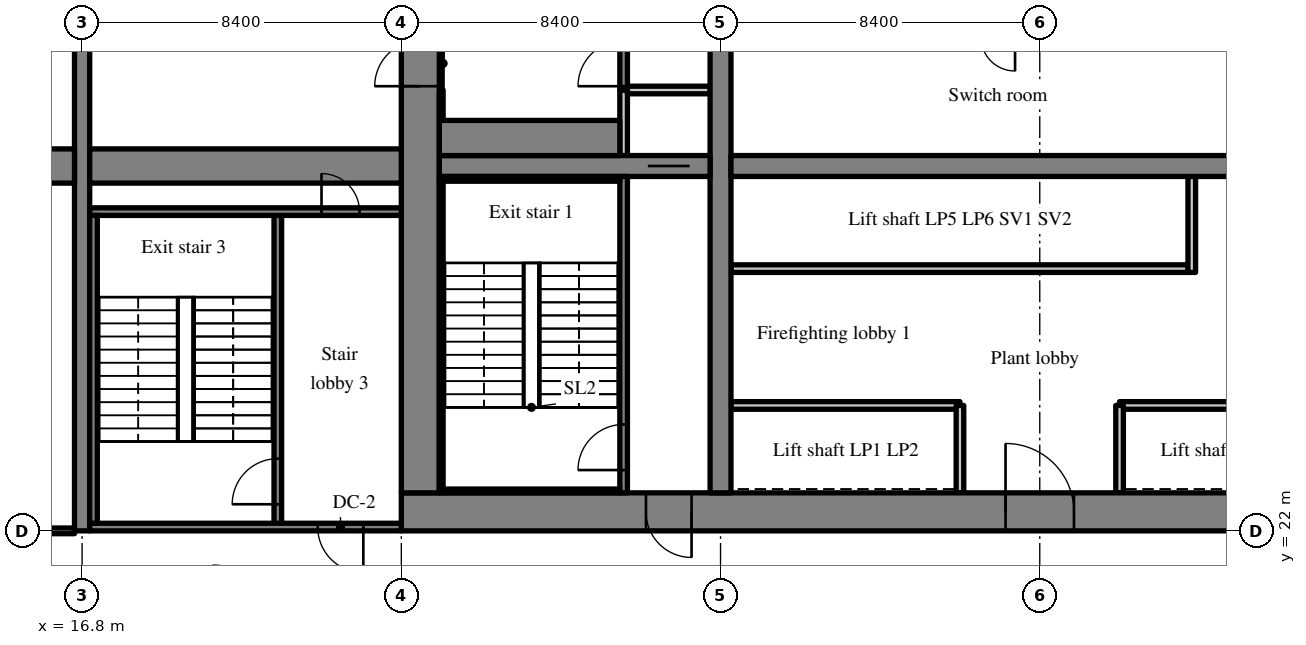
"""IFC4 building model, lengths in metres.
Left out: names, types, materials, properties, quantities, classifications, styles, units other than length and angle.
Written with IfcOpenShell. Run it as: python <this file> out.ifc"""

import sys

from ifc_helpers import new_model, si_unit, direction, frame, frame_2d, origin, place, context, subcontext, project, spatial, rectangle, extrude, source, transform, mapped, element, fill, save


model = new_model("IFC4")
c1 = context("Model", 3, precision=1e-05, world=origin(), true_north=direction((0.0, 1.0)))
c2 = subcontext(c1, "Body", "Model", "MODEL_VIEW")
j1 = project(units=[si_unit("LENGTHUNIT", "METRE"), si_unit("PLANEANGLEUNIT", "RADIAN")], contexts=[c1])
p1 = place(None, origin())
s1 = spatial("IfcSite", under=j1, at=p1, CompositionType="ELEMENT")
p2 = place(p1, origin())
s2 = spatial("IfcBuilding", under=s1, at=p2, CompositionType="ELEMENT")
p3 = place(p2, frame((0.0, 0.0, 81.0)))
s3 = spatial("IfcBuildingStorey", under=s2, at=p3, CompositionType="ELEMENT", Elevation=81.0)
m1 = source(origin(), c2, "Body", "SweptSolid", [
    extrude(rectangle(XDim=50.4, YDim=1.0, at=frame_2d((25.2, 0.0))), origin(), (0.0, 0.0, 1.0), 5.12),
])
p4 = place(p3, frame((25.2, 22.5, 0.0), z_axis=(0.0, 0.0, 1.0), x_axis=(1.0, 0.0, 0.0)))
e1 = element("IfcWall", 1, at=p4, inside=s3, PredefinedType="SHEAR", context=c2, shape_type="MappedRepresentation", body=[
    mapped(m1, transform((0.0, 0.0, 0.0), scale=1.0)),
])
m2 = source(origin(), c2, "Body", "SweptSolid", [
    extrude(rectangle(XDim=1.8, YDim=2.1, at=frame_2d((0.9, 1.05))), frame((0.0, 0.51, 0.0), z_axis=(0.0, -1.0, 0.0), x_axis=(1.0, 0.0, 0.0)), (0.0, 0.0, 1.0), 1.02),
])
p5 = place(p4, frame((15.9, 0.0, 0.0)))
e2 = element("IfcOpeningElement", 2, at=p5, cuts=e1, PredefinedType="OPENING", context=c2, shape_type="MappedRepresentation", body=[
    mapped(m2, transform((0.0, 0.0, 0.0), scale=1.0)),
])
m3 = source(origin(), c2, "Body", "SweptSolid", [
    extrude(rectangle(XDim=1.2, YDim=2.1, at=frame_2d((0.6, 1.05))), frame((0.0, 0.51, 0.0), z_axis=(0.0, -1.0, 0.0), x_axis=(1.0, 0.0, 0.0)), (0.0, 0.0, 1.0), 1.02),
])
p6 = place(p4, frame((26.987, 0.0, 0.0)))
e3 = element("IfcOpeningElement", 3, at=p6, cuts=e1, PredefinedType="OPENING", context=c2, shape_type="MappedRepresentation", body=[
    mapped(m3, transform((0.0, 0.0, 0.0), scale=1.0)),
])
m4 = source(origin(), c2, "Body", "SweptSolid", [
    extrude(rectangle(XDim=0.9, YDim=2.1, at=frame_2d((0.45, 1.05))), frame((0.0, 0.51, 0.0), z_axis=(0.0, -1.0, 0.0), x_axis=(1.0, 0.0, 0.0)), (0.0, 0.0, 1.0), 1.02),
])
p7 = place(p4, frame((33.75, 0.0, 0.0)))
e4 = element("IfcOpeningElement", 4, at=p7, cuts=e1, PredefinedType="OPENING", context=c2, shape_type="MappedRepresentation", body=[
    mapped(m4, transform((0.0, 0.0, 0.0), scale=1.0)),
])
p8 = place(p4, frame((30.75, 0.0, 0.0)))
e5 = element("IfcOpeningElement", 5, at=p8, cuts=e1, PredefinedType="OPENING", context=c2, shape_type="MappedRepresentation", body=[
    mapped(m4, transform((0.0, 0.0, 0.0), scale=1.0)),
])
p9 = place(p4, frame((38.262, 0.0, 0.0)))
e6 = element("IfcOpeningElement", 6, at=p9, cuts=e1, PredefinedType="OPENING", context=c2, shape_type="MappedRepresentation", body=[
    mapped(m4, transform((0.0, 0.0, 0.0), scale=1.0)),
])
p10 = place(p4, frame((6.438, 0.0, 0.0)))
e7 = element("IfcOpeningElement", 7, at=p10, cuts=e1, PredefinedType="OPENING", context=c2, shape_type="MappedRepresentation", body=[
    mapped(m3, transform((0.0, 0.0, 0.0), scale=1.0)),
])
p11 = place(p4, frame((47.725, 0.0, 0.0)))
e8 = element("IfcOpeningElement", 8, at=p11, cuts=e1, PredefinedType="OPENING", context=c2, shape_type="MappedRepresentation", body=[
    mapped(m3, transform((0.0, 0.0, 0.0), scale=1.0)),
])
m5 = source(origin(), c2, "Body", "SweptSolid", [
    extrude(rectangle(XDim=18.0, YDim=1.0, at=frame_2d((9.0, 0.0))), origin(), (0.0, 0.0, 1.0), 5.12),
])
p12 = place(p3, frame((25.7, 23.0, 0.0), z_axis=(0.0, 0.0, 1.0), x_axis=(0.0, 1.0, 0.0)))
e9 = element("IfcWall", 9, at=p12, inside=s3, PredefinedType="SHEAR", context=c2, shape_type="MappedRepresentation", body=[
    mapped(m5, transform((0.0, 0.0, 0.0), scale=1.0)),
])
p13 = place(p12, frame((10.7, 0.0, 0.0)))
e10 = element("IfcOpeningElement", 10, at=p13, cuts=e9, PredefinedType="OPENING", context=c2, shape_type="MappedRepresentation", body=[
    mapped(m3, transform((0.0, 0.0, 0.0), scale=1.0)),
])
m6 = source(origin(), c2, "Body", "SweptSolid", [
    extrude(rectangle(XDim=18.0, YDim=0.55, at=frame_2d((9.0, 0.0))), origin(), (0.0, 0.0, 1.0), 5.12),
])
p14 = place(p3, frame((33.6, 23.0, 0.0), z_axis=(0.0, 0.0, 1.0), x_axis=(0.0, 1.0, 0.0)))
e11 = element("IfcWall", 11, at=p14, inside=s3, PredefinedType="SHEAR", context=c2, shape_type="MappedRepresentation", body=[
    mapped(m6, transform((0.0, 0.0, 0.0), scale=1.0)),
])
m7 = source(origin(), c2, "Body", "SweptSolid", [
    extrude(rectangle(XDim=1.1, YDim=2.1, at=frame_2d((0.55, 1.05))), frame((0.0, 0.285, 0.0), z_axis=(0.0, -1.0, 0.0), x_axis=(1.0, 0.0, 0.0)), (0.0, 0.0, 1.0), 0.57),
])
p15 = place(p14, frame((12.45, 0.0, 0.0)))
e12 = element("IfcOpeningElement", 12, at=p15, cuts=e11, PredefinedType="OPENING", context=c2, shape_type="MappedRepresentation", body=[
    mapped(m7, transform((0.0, 0.0, 0.0), scale=1.0)),
])
m8 = source(origin(), c2, "Body", "SweptSolid", [
    extrude(rectangle(XDim=7.125, YDim=0.55, at=frame_2d((3.562, 0.0))), origin(), (0.0, 0.0, 1.0), 5.12),
])
p16 = place(p3, frame((26.2, 31.6, 0.0), z_axis=(0.0, 0.0, 1.0), x_axis=(1.0, 0.0, 0.0)))
e13 = element("IfcWall", 13, at=p16, inside=s3, PredefinedType="SHEAR", context=c2, shape_type="MappedRepresentation", body=[
    mapped(m8, transform((0.0, 0.0, 0.0), scale=1.0)),
])
p17 = place(p16, frame((5.488, 0.0, 0.0)))
e14 = element("IfcOpeningElement", 14, at=p17, cuts=e13, PredefinedType="OPENING", context=c2, shape_type="MappedRepresentation", body=[
    mapped(m7, transform((0.0, 0.0, 0.0), scale=1.0)),
])
m9 = source(origin(), c2, "Body", "SweptSolid", [
    extrude(rectangle(XDim=16.25, YDim=0.55, at=frame_2d((8.125, 0.0))), origin(), (0.0, 0.0, 1.0), 5.12),
])
p18 = place(p3, frame((33.875, 31.6, 0.0), z_axis=(0.0, 0.0, 1.0), x_axis=(1.0, 0.0, 0.0)))
e15 = element("IfcWall", 15, at=p18, inside=s3, PredefinedType="SHEAR", context=c2, shape_type="MappedRepresentation", body=[
    mapped(m9, transform((0.0, 0.0, 0.0), scale=1.0)),
])
m10 = source(origin(), c2, "Body", "SweptSolid", [
    extrude(rectangle(XDim=1.0, YDim=2.1, at=frame_2d((0.5, 1.05))), frame((0.0, 0.285, 0.0), z_axis=(0.0, -1.0, 0.0), x_axis=(1.0, 0.0, 0.0)), (0.0, 0.0, 1.0), 0.57),
])
p19 = place(p18, frame((14.687, 0.0, 0.0)))
e16 = element("IfcOpeningElement", 16, at=p19, cuts=e15, PredefinedType="OPENING", context=c2, shape_type="MappedRepresentation", body=[
    mapped(m10, transform((0.0, 0.0, 0.0), scale=1.0)),
])
m11 = source(origin(), c2, "Body", "SweptSolid", [
    extrude(rectangle(XDim=20.0, YDim=0.4, at=frame_2d((10.0, 0.0))), origin(), (0.0, 0.0, 1.0), 5.12),
])
p20 = place(p3, frame((16.8, 22.0, 0.0), z_axis=(0.0, 0.0, 1.0), x_axis=(0.0, 1.0, 0.0)))
e17 = element("IfcWall", 17, at=p20, inside=s3, PredefinedType="SHEAR", context=c2, shape_type="MappedRepresentation", body=[
    mapped(m11, transform((0.0, 0.0, 0.0), scale=1.0)),
])
m12 = source(origin(), c2, "Body", "SweptSolid", [
    extrude(rectangle(XDim=1.2, YDim=2.1, at=frame_2d((0.6, 1.05))), frame((0.0, 0.21, 0.0), z_axis=(0.0, -1.0, 0.0), x_axis=(1.0, 0.0, 0.0)), (0.0, 0.0, 1.0), 0.42),
])
p21 = place(p20, frame((13.4, 0.0, 0.0)))
e18 = element("IfcOpeningElement", 18, at=p21, cuts=e17, PredefinedType="OPENING", context=c2, shape_type="MappedRepresentation", body=[
    mapped(m12, transform((0.0, 0.0, 0.0), scale=1.0)),
])
m13 = source(origin(), c2, "Body", "SweptSolid", [
    extrude(rectangle(XDim=8.0, YDim=0.9, at=frame_2d((4.0, 0.0))), origin(), (0.0, 0.0, 1.0), 5.12),
])
p22 = place(p3, frame((8.6, 31.6, 0.0), z_axis=(0.0, 0.0, 1.0), x_axis=(1.0, 0.0, 0.0)))
e19 = element("IfcWall", 19, at=p22, inside=s3, PredefinedType="SHEAR", context=c2, shape_type="MappedRepresentation", body=[
    mapped(m13, transform((0.0, 0.0, 0.0), scale=1.0)),
])
m14 = source(origin(), c2, "Body", "SweptSolid", [
    extrude(rectangle(XDim=8.2, YDim=0.9, at=frame_2d((4.1, 0.0))), origin(), (0.0, 0.0, 1.0), 5.12),
])
p23 = place(p3, frame((17.0, 31.6, 0.0), z_axis=(0.0, 0.0, 1.0), x_axis=(1.0, 0.0, 0.0)))
e20 = element("IfcWall", 20, at=p23, inside=s3, PredefinedType="SHEAR", context=c2, shape_type="MappedRepresentation", body=[
    mapped(m14, transform((0.0, 0.0, 0.0), scale=1.0)),
])
m15 = source(origin(), c2, "Body", "SweptSolid", [
    extrude(rectangle(XDim=6.025, YDim=0.2, at=frame_2d((3.012, 0.0))), origin(), (0.0, 0.0, 1.0), 5.12),
])
p24 = place(p3, frame((33.875, 25.3, 0.0), z_axis=(0.0, 0.0, 1.0), x_axis=(1.0, 0.0, 0.0)))
e21 = element("IfcWall", 21, at=p24, inside=s3, PredefinedType="SOLIDWALL", context=c2, shape_type="MappedRepresentation", body=[
    mapped(m15, transform((0.0, 0.0, 0.0), scale=1.0)),
])
m16 = source(origin(), c2, "Body", "SweptSolid", [
    extrude(rectangle(XDim=6.0, YDim=0.2, at=frame_2d((3.0, 0.0))), origin(), (0.0, 0.0, 1.0), 5.12),
])
p25 = place(p3, frame((44.1, 25.3, 0.0), z_axis=(0.0, 0.0, 1.0), x_axis=(1.0, 0.0, 0.0)))
e22 = element("IfcWall", 22, at=p25, inside=s3, PredefinedType="SOLIDWALL", context=c2, shape_type="MappedRepresentation", body=[
    mapped(m16, transform((0.0, 0.0, 0.0), scale=1.0)),
])
m17 = source(origin(), c2, "Body", "SweptSolid", [
    extrude(rectangle(XDim=12.025, YDim=0.2, at=frame_2d((6.012, 0.0))), origin(), (0.0, 0.0, 1.0), 5.12),
])
p26 = place(p3, frame((33.875, 28.9, 0.0), z_axis=(0.0, 0.0, 1.0), x_axis=(1.0, 0.0, 0.0)))
e23 = element("IfcWall", 23, at=p26, inside=s3, PredefinedType="SOLIDWALL", context=c2, shape_type="MappedRepresentation", body=[
    mapped(m17, transform((0.0, 0.0, 0.0), scale=1.0)),
])
m18 = source(origin(), c2, "Body", "SweptSolid", [
    extrude(rectangle(XDim=2.3, YDim=0.2, at=frame_2d((1.15, 0.0))), origin(), (0.0, 0.0, 1.0), 5.12),
])
for number, where, z_axis, x_axis in (
    (24, (39.9, 23.0, 0.0), (0.0, 0.0, 1.0), (0.0, 1.0, 0.0)),
    (25, (44.1, 23.0, 0.0), (0.0, 0.0, 1.0), (0.0, 1.0, 0.0)),
):
    element("IfcWall", number, at=place(p3, frame(where, z_axis=z_axis, x_axis=x_axis)), inside=s3, PredefinedType="SOLIDWALL", context=c2, shape_type="MappedRepresentation", body=[
        mapped(m18, transform((0.0, 0.0, 0.0), scale=1.0)),
    ])
m19 = source(origin(), c2, "Body", "SweptSolid", [
    extrude(rectangle(XDim=2.525, YDim=0.2, at=frame_2d((1.262, 0.0))), origin(), (0.0, 0.0, 1.0), 5.12),
])
p27 = place(p3, frame((46.0, 28.8, 0.0), z_axis=(0.0, 0.0, 1.0), x_axis=(0.0, 1.0, 0.0)))
e26 = element("IfcWall", 26, at=p27, inside=s3, PredefinedType="SOLIDWALL", context=c2, shape_type="MappedRepresentation", body=[
    mapped(m19, transform((0.0, 0.0, 0.0), scale=1.0)),
])
m20 = source(origin(), c2, "Body", "SweptSolid", [
    extrude(rectangle(XDim=8.325, YDim=0.2, at=frame_2d((4.163, 0.0))), origin(), (0.0, 0.0, 1.0), 5.12),
])
p28 = place(p3, frame((31.05, 23.0, 0.0), z_axis=(0.0, 0.0, 1.0), x_axis=(0.0, 1.0, 0.0)))
e27 = element("IfcWall", 27, at=p28, inside=s3, PredefinedType="SOLIDWALL", context=c2, shape_type="MappedRepresentation", body=[
    mapped(m20, transform((0.0, 0.0, 0.0), scale=1.0)),
])
m21 = source(origin(), c2, "Body", "SweptSolid", [
    extrude(rectangle(XDim=1.2, YDim=2.1, at=frame_2d((0.6, 1.05))), frame((0.0, 0.11, 0.0), z_axis=(0.0, -1.0, 0.0), x_axis=(1.0, 0.0, 0.0)), (0.0, 0.0, 1.0), 0.22),
])
p29 = place(p28, frame((0.6, 0.0, 0.0)))
e28 = element("IfcOpeningElement", 28, at=p29, cuts=e27, PredefinedType="OPENING", context=c2, shape_type="MappedRepresentation", body=[
    mapped(m21, transform((0.0, 0.0, 0.0), scale=1.0)),
])
m22 = source(origin(), c2, "Body", "SweptSolid", [
    extrude(rectangle(XDim=1.725, YDim=0.2, at=frame_2d((0.863, 0.0))), origin(), (0.0, 0.0, 1.0), 5.12),
])
p30 = place(p3, frame((31.05, 31.875, 0.0), z_axis=(0.0, 0.0, 1.0), x_axis=(0.0, 1.0, 0.0)))
e29 = element("IfcWall", 29, at=p30, inside=s3, PredefinedType="SOLIDWALL", context=c2, shape_type="MappedRepresentation", body=[
    mapped(m22, transform((0.0, 0.0, 0.0), scale=1.0)),
])
m23 = source(origin(), c2, "Body", "SweptSolid", [
    extrude(rectangle(XDim=2.175, YDim=0.2, at=frame_2d((1.087, 0.0))), origin(), (0.0, 0.0, 1.0), 5.12),
])
p31 = place(p3, frame((31.15, 33.6, 0.0), z_axis=(0.0, 0.0, 1.0), x_axis=(1.0, 0.0, 0.0)))
e30 = element("IfcWall", 30, at=p31, inside=s3, PredefinedType="SOLIDWALL", context=c2, shape_type="MappedRepresentation", body=[
    mapped(m23, transform((0.0, 0.0, 0.0), scale=1.0)),
])
m24 = source(origin(), c2, "Body", "SweptSolid", [
    extrude(rectangle(XDim=7.4, YDim=0.2, at=frame_2d((3.7, 0.0))), origin(), (0.0, 0.0, 1.0), 5.12),
])
p32 = place(p3, frame((31.05, 33.6, 0.0), z_axis=(0.0, 0.0, 1.0), x_axis=(0.0, 1.0, 0.0)))
e31 = element("IfcWall", 31, at=p32, inside=s3, PredefinedType="SOLIDWALL", context=c2, shape_type="MappedRepresentation", body=[
    mapped(m24, transform((0.0, 0.0, 0.0), scale=1.0)),
])
p33 = place(p32, frame((0.1, 0.0, 0.0)))
e32 = element("IfcOpeningElement", 32, at=p33, cuts=e31, PredefinedType="OPENING", context=c2, shape_type="MappedRepresentation", body=[
    mapped(m21, transform((0.0, 0.0, 0.0), scale=1.0)),
])
m25 = source(origin(), c2, "Body", "SweptSolid", [
    extrude(rectangle(XDim=8.3, YDim=0.2, at=frame_2d((4.15, 0.0))), origin(), (0.0, 0.0, 1.0), 5.12),
])
p34 = place(p3, frame((21.95, 22.1, 0.0), z_axis=(0.0, 0.0, 1.0), x_axis=(0.0, 1.0, 0.0)))
e33 = element("IfcWall", 33, at=p34, inside=s3, PredefinedType="SOLIDWALL", context=c2, shape_type="MappedRepresentation", body=[
    mapped(m25, transform((0.0, 0.0, 0.0), scale=1.0)),
])
p35 = place(p34, frame((0.6, 0.0, 0.0)))
e34 = element("IfcOpeningElement", 34, at=p35, cuts=e33, PredefinedType="OPENING", context=c2, shape_type="MappedRepresentation", body=[
    mapped(m21, transform((0.0, 0.0, 0.0), scale=1.0)),
])
m26 = source(origin(), c2, "Body", "SweptSolid", [
    extrude(rectangle(XDim=8.2, YDim=0.2, at=frame_2d((4.1, 0.0))), origin(), (0.0, 0.0, 1.0), 5.12),
])
p36 = place(p3, frame((17.0, 22.1, 0.0), z_axis=(0.0, 0.0, 1.0), x_axis=(1.0, 0.0, 0.0)))
e35 = element("IfcWall", 35, at=p36, inside=s3, PredefinedType="SOLIDWALL", context=c2, shape_type="MappedRepresentation", body=[
    mapped(m26, transform((0.0, 0.0, 0.0), scale=1.0)),
])
p37 = place(p36, frame((6.0, 0.0, 0.0)))
e36 = element("IfcOpeningElement", 36, at=p37, cuts=e35, PredefinedType="OPENING", context=c2, shape_type="MappedRepresentation", body=[
    mapped(m21, transform((0.0, 0.0, 0.0), scale=1.0)),
])
p38 = place(p3, frame((25.2, 30.4, 0.0), z_axis=(0.0, 0.0, 1.0), x_axis=(-1.0, 0.0, 0.0)))
e37 = element("IfcWall", 37, at=p38, inside=s3, PredefinedType="SOLIDWALL", context=c2, shape_type="MappedRepresentation", body=[
    mapped(m26, transform((0.0, 0.0, 0.0), scale=1.0)),
])
m27 = source(origin(), c2, "Body", "SweptSolid", [
    extrude(rectangle(XDim=1.0, YDim=2.1, at=frame_2d((0.5, 1.05))), frame((0.0, 0.11, 0.0), z_axis=(0.0, -1.0, 0.0), x_axis=(1.0, 0.0, 0.0)), (0.0, 0.0, 1.0), 0.22),
])
p39 = place(p38, frame((1.1, 0.0, 0.0)))
e38 = element("IfcOpeningElement", 38, at=p39, cuts=e37, PredefinedType="OPENING", context=c2, shape_type="MappedRepresentation", body=[
    mapped(m27, transform((0.0, 0.0, 0.0), scale=1.0)),
])
m28 = source(origin(), c2, "Body", "SweptSolid", [
    extrude(rectangle(XDim=4.75, YDim=0.1, at=frame_2d((2.375, 0.0))), origin(), (0.0, 0.0, 1.0), 5.12),
])
p40 = place(p3, frame((26.2, 23.05, 0.0), z_axis=(0.0, 0.0, 1.0), x_axis=(1.0, 0.0, 0.0)))
e39 = element("IfcWall", 39, at=p40, inside=s3, PredefinedType="SOLIDWALL", context=c2, shape_type="MappedRepresentation", body=[
    mapped(m28, transform((0.0, 0.0, 0.0), scale=1.0)),
])
m29 = source(origin(), c2, "Body", "SweptSolid", [
    extrude(rectangle(XDim=4.75, YDim=0.125, at=frame_2d((2.375, 0.0))), origin(), (0.0, 0.0, 1.0), 5.12),
])
p41 = place(p3, frame((26.2, 31.262, 0.0), z_axis=(0.0, 0.0, 1.0), x_axis=(1.0, 0.0, 0.0)))
e40 = element("IfcWall", 40, at=p41, inside=s3, PredefinedType="SOLIDWALL", context=c2, shape_type="MappedRepresentation", body=[
    mapped(m29, transform((0.0, 0.0, 0.0), scale=1.0)),
])
m30 = source(origin(), c2, "Body", "SweptSolid", [
    extrude(rectangle(XDim=8.1, YDim=0.1, at=frame_2d((4.05, 0.0))), origin(), (0.0, 0.0, 1.0), 5.12),
])
p42 = place(p3, frame((26.25, 23.1, 0.0), z_axis=(0.0, 0.0, 1.0), x_axis=(0.0, 1.0, 0.0)))
e41 = element("IfcWall", 41, at=p42, inside=s3, PredefinedType="SOLIDWALL", context=c2, shape_type="MappedRepresentation", body=[
    mapped(m30, transform((0.0, 0.0, 0.0), scale=1.0)),
])
m31 = source(origin(), c2, "Body", "SweptSolid", [
    extrude(rectangle(XDim=8.1, YDim=0.2, at=frame_2d((4.05, 0.0))), origin(), (0.0, 0.0, 1.0), 5.12),
])
p43 = place(p3, frame((17.1, 22.2, 0.0), z_axis=(0.0, 0.0, 1.0), x_axis=(0.0, 1.0, 0.0)))
e42 = element("IfcWall", 42, at=p43, inside=s3, PredefinedType="SOLIDWALL", context=c2, shape_type="MappedRepresentation", body=[
    mapped(m31, transform((0.0, 0.0, 0.0), scale=1.0)),
])
m32 = source(origin(), c2, "Body", "SweptSolid", [
    extrude(rectangle(XDim=4.75, YDim=0.925, at=frame_2d((2.375, 0.0))), origin(), (0.0, 0.0, 1.0), 5.12),
])
p44 = place(p3, frame((26.2, 32.337, 0.0), z_axis=(0.0, 0.0, 1.0), x_axis=(1.0, 0.0, 0.0)))
e43 = element("IfcWall", 43, at=p44, inside=s3, PredefinedType="SOLIDWALL", context=c2, shape_type="MappedRepresentation", body=[
    mapped(m32, transform((0.0, 0.0, 0.0), scale=1.0)),
])
m33 = source(origin(), c2, "Body", "SweptSolid", [
    extrude(rectangle(XDim=0.8, YDim=0.1, at=frame_2d((0.4, 0.0))), origin(), (0.0, 0.0, 1.0), 5.12),
])
p45 = place(p3, frame((26.25, 32.8, 0.0), z_axis=(0.0, 0.0, 1.0), x_axis=(0.0, 1.0, 0.0)))
e44 = element("IfcWall", 44, at=p45, inside=s3, PredefinedType="SOLIDWALL", context=c2, shape_type="MappedRepresentation", body=[
    mapped(m33, transform((0.0, 0.0, 0.0), scale=1.0)),
])
m34 = source(origin(), c2, "Body", "SweptSolid", [
    extrude(rectangle(XDim=8.0, YDim=0.15, at=frame_2d((4.0, 0.0))), origin(), (0.0, 0.0, 1.0), 4.37),
])
p46 = place(p3, frame((8.6, 22.0, 0.0), z_axis=(0.0, 0.0, 1.0), x_axis=(1.0, 0.0, 0.0)))
e45 = element("IfcWall", 45, at=p46, inside=s3, PredefinedType="PARTITIONING", context=c2, shape_type="MappedRepresentation", body=[
    mapped(m34, transform((0.0, 0.0, 0.0), scale=1.0)),
])
m35 = source(origin(), c2, "Body", "SweptSolid", [
    extrude(rectangle(XDim=1.2, YDim=2.1, at=frame_2d((0.6, 1.05))), frame((0.0, 0.085, 0.0), z_axis=(0.0, -1.0, 0.0), x_axis=(1.0, 0.0, 0.0)), (0.0, 0.0, 1.0), 0.17),
])
p47 = place(p46, frame((3.4, 0.0, 0.0)))
e46 = element("IfcOpeningElement", 46, at=p47, cuts=e45, PredefinedType="OPENING", context=c2, shape_type="MappedRepresentation", body=[
    mapped(m35, transform((0.0, 0.0, 0.0), scale=1.0)),
])
m36 = source(origin(), c2, "Body", "SweptSolid", [
    extrude(rectangle(XDim=1.8, YDim=2.1, at=frame_2d((0.9, 1.05))), frame((0.0, 0.375, 0.0), z_axis=(0.0, -1.0, 0.0), x_axis=(1.0, 0.0, 0.0)), (0.0, 0.0, 1.0), 0.05),
])
p48 = place(p5, origin())
e47 = element("IfcDoor", 47, at=p48, inside=s3, OperationType="DOUBLE_DOOR_SINGLE_SWING", PredefinedType="DOOR", context=c2, shape_type="MappedRepresentation", body=[
    mapped(m36, transform((0.0, 0.0, 0.0), scale=1.0)),
])
fill(e2, e47)
m37 = source(origin(), c2, "Body", "SweptSolid", [
    extrude(rectangle(XDim=1.2, YDim=2.1, at=frame_2d((0.6, 1.05))), frame((0.0, 0.025, 0.0), z_axis=(0.0, -1.0, 0.0), x_axis=(1.0, 0.0, 0.0)), (0.0, 0.0, 1.0), 0.05),
])
p49 = place(p29, origin())
e48 = element("IfcDoor", 48, at=p49, inside=s3, OperationType="SINGLE_SWING_LEFT", PredefinedType="DOOR", context=c2, shape_type="MappedRepresentation", body=[
    mapped(m37, transform((0.0, 0.0, 0.0), scale=1.0)),
])
fill(e28, e48)
m38 = source(origin(), c2, "Body", "SweptSolid", [
    extrude(rectangle(XDim=1.2, YDim=2.1, at=frame_2d((0.6, 1.05))), frame((0.0, 0.375, 0.0), z_axis=(0.0, -1.0, 0.0), x_axis=(1.0, 0.0, 0.0)), (0.0, 0.0, 1.0), 0.05),
])
p50 = place(p10, origin())
e49 = element("IfcDoor", 49, at=p50, inside=s3, OperationType="SINGLE_SWING_RIGHT", PredefinedType="DOOR", context=c2, shape_type="MappedRepresentation", body=[
    mapped(m38, transform((0.0, 0.0, 0.0), scale=1.0)),
])
fill(e7, e49)
m39 = source(origin(), c2, "Body", "SweptSolid", [
    extrude(rectangle(XDim=1.1, YDim=2.1, at=frame_2d((0.55, 1.05))), frame((0.0, 0.025, 0.0), z_axis=(0.0, -1.0, 0.0), x_axis=(1.0, 0.0, 0.0)), (0.0, 0.0, 1.0), 0.05),
])
p51 = place(p17, origin())
e50 = element("IfcDoor", 50, at=p51, inside=s3, OperationType="SLIDING_TO_LEFT", PredefinedType="DOOR", context=c2, shape_type="MappedRepresentation", body=[
    mapped(m39, transform((0.0, 0.0, 0.0), scale=1.0)),
])
fill(e14, e50)
p52 = place(p33, origin())
e51 = element("IfcDoor", 51, at=p52, inside=s3, OperationType="SINGLE_SWING_LEFT", PredefinedType="DOOR", context=c2, shape_type="MappedRepresentation", body=[
    mapped(m37, transform((0.0, 0.0, 0.0), scale=1.0)),
])
fill(e32, e51)
p53 = place(p35, origin())
e52 = element("IfcDoor", 52, at=p53, inside=s3, OperationType="SINGLE_SWING_LEFT", PredefinedType="DOOR", context=c2, shape_type="MappedRepresentation", body=[
    mapped(m37, transform((0.0, 0.0, 0.0), scale=1.0)),
])
fill(e34, e52)
p54 = place(p37, origin())
e53 = element("IfcDoor", 53, at=p54, inside=s3, OperationType="SINGLE_SWING_RIGHT", PredefinedType="DOOR", context=c2, shape_type="MappedRepresentation", body=[
    mapped(m37, transform((0.0, 0.0, 0.0), scale=1.0)),
])
fill(e36, e53)
m40 = source(origin(), c2, "Body", "SweptSolid", [
    extrude(rectangle(XDim=1.0, YDim=2.1, at=frame_2d((0.5, 1.05))), frame((0.0, 0.025, 0.0), z_axis=(0.0, -1.0, 0.0), x_axis=(1.0, 0.0, 0.0)), (0.0, 0.0, 1.0), 0.05),
])
p55 = place(p39, origin())
e54 = element("IfcDoor", 54, at=p55, inside=s3, OperationType="SINGLE_SWING_RIGHT", PredefinedType="DOOR", context=c2, shape_type="MappedRepresentation", body=[
    mapped(m40, transform((0.0, 0.0, 0.0), scale=1.0)),
])
fill(e38, e54)
p56 = place(p13, origin())
e55 = element("IfcDoor", 55, at=p56, inside=s3, OperationType="SINGLE_SWING_LEFT", PredefinedType="DOOR", context=c2, shape_type="MappedRepresentation", body=[
    mapped(m37, transform((0.0, 0.0, 0.0), scale=1.0)),
])
fill(e10, e55)
save(model, sys.argv[1])
